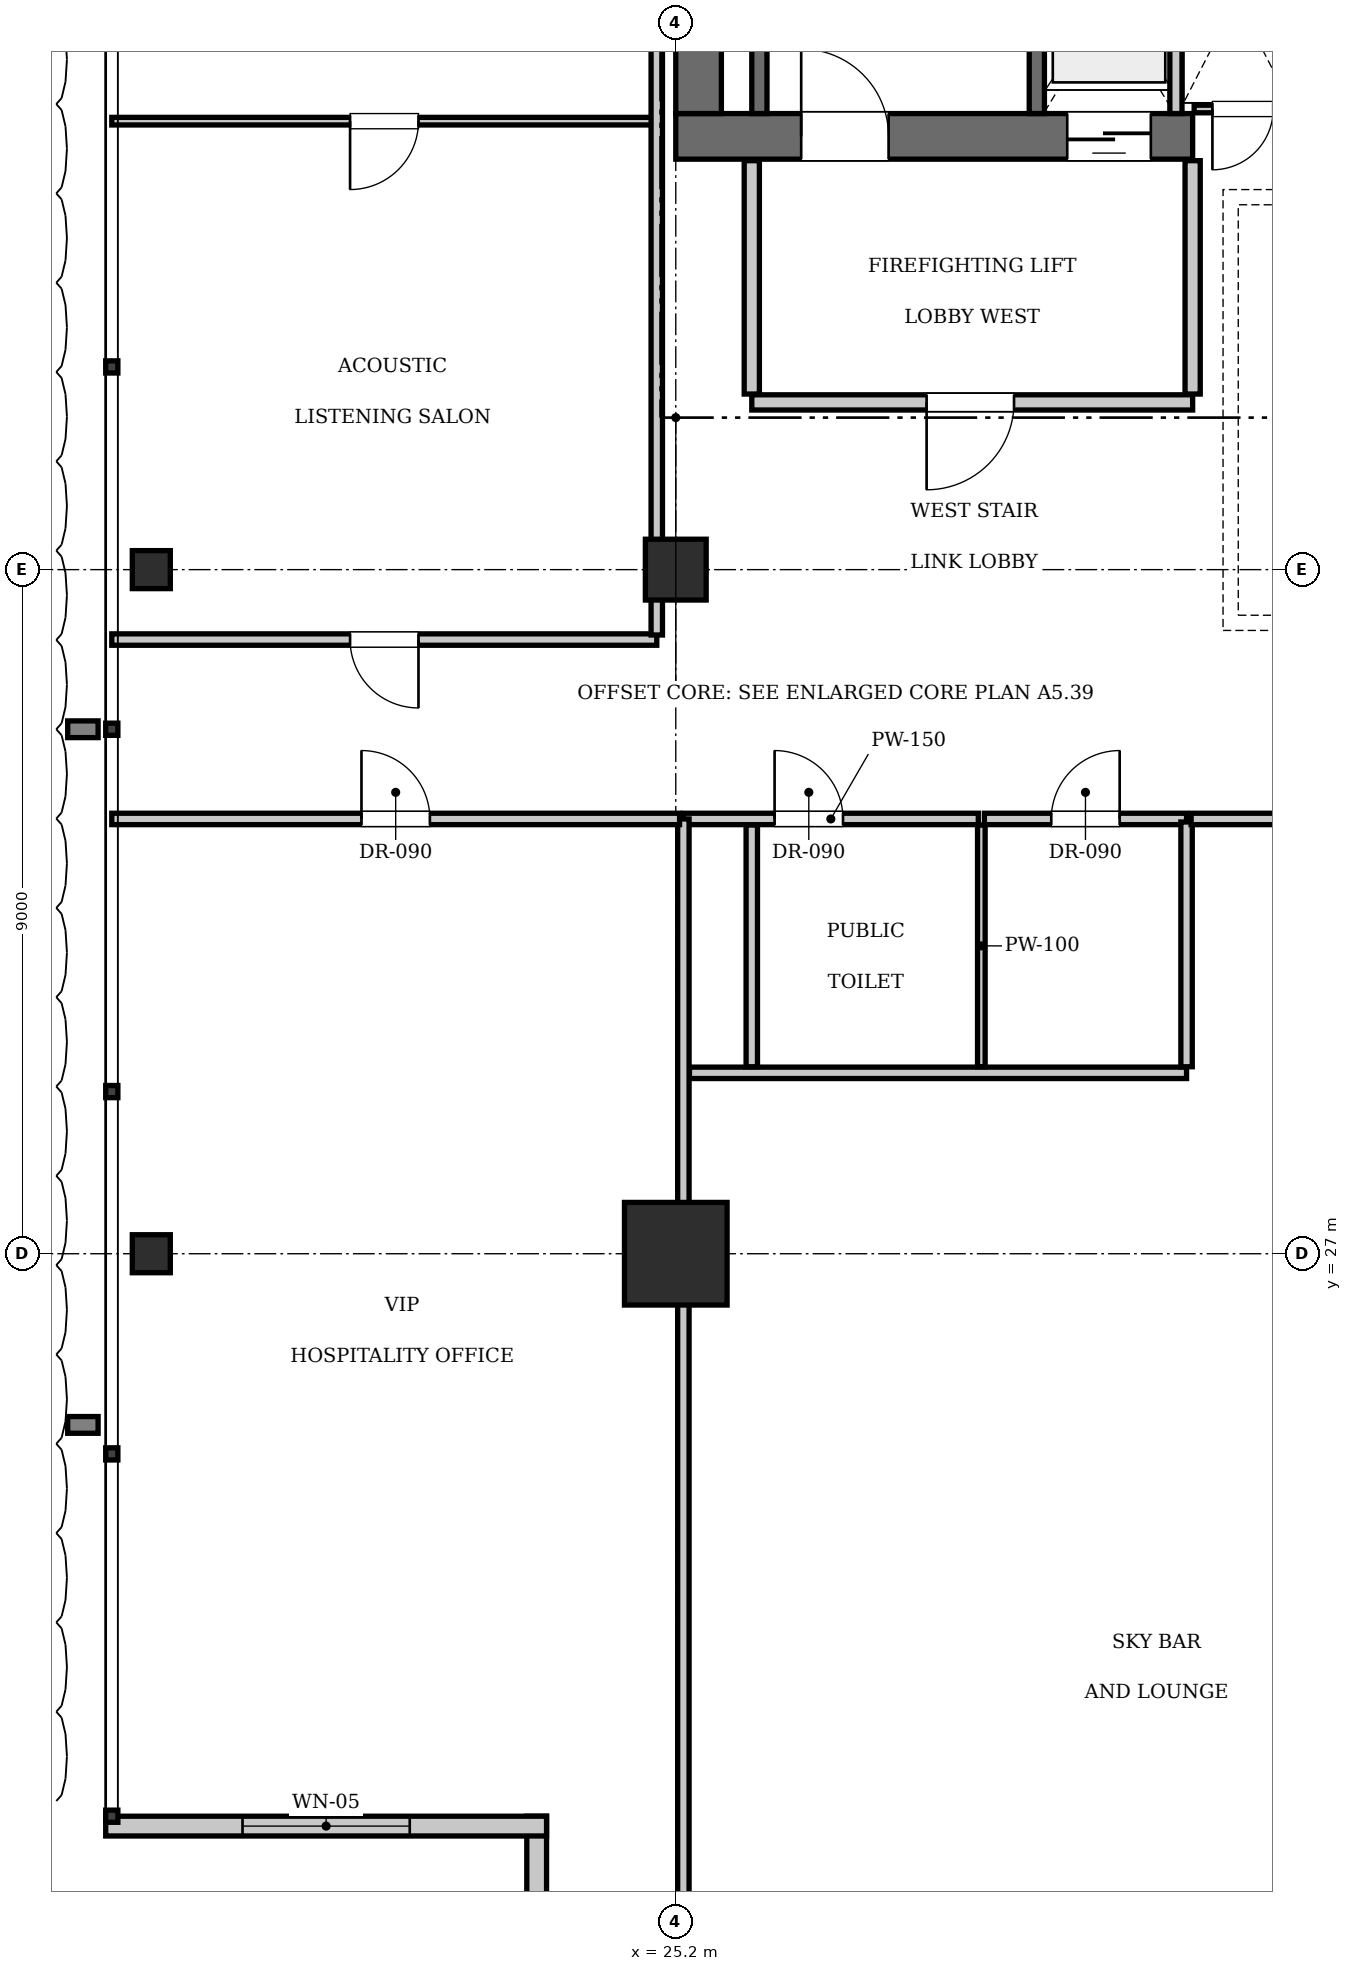
"""IFC4 building model, lengths in metres.
Left out: names, types, materials, properties, quantities, classifications, styles, units other than length and angle.
Written with IfcOpenShell. Run it as: python <this file> out.ifc"""

import sys

from ifc_helpers import new_model, si_unit, direction, frame, frame_2d, origin, origin_2d, place, context, subcontext, project, spatial, rectangle, i_section, extrude, element, fill, save


model = new_model("IFC4")
c1 = context("Model", 3, precision=1e-05, world=origin(), true_north=direction((0.0, 1.0)))
c2 = subcontext(c1, "Body", "Model", "MODEL_VIEW")
j1 = project(units=[si_unit("LENGTHUNIT", "METRE"), si_unit("PLANEANGLEUNIT", "RADIAN")], contexts=[c1])
p1 = place(None, origin())
s1 = spatial("IfcSite", under=j1, at=p1, CompositionType="ELEMENT")
p2 = place(p1, origin())
s2 = spatial("IfcBuilding", under=s1, at=p2, CompositionType="ELEMENT")
p3 = place(p2, frame((0.0, 0.0, 349.65)))
s3 = spatial("IfcBuildingStorey", under=s2, at=p3, CompositionType="ELEMENT", Elevation=349.65)
p4 = place(p3, frame((25.2, 27.0, 0.0), z_axis=(0.0, 0.0, 1.0), x_axis=(1.0, 0.0, 0.0)))
e1 = element("IfcColumn", 1, at=p4, inside=s3, PredefinedType="COLUMN", context=c2, shape_type="SweptSolid", body=[
    extrude(rectangle(XDim=1.35, YDim=1.35, at=origin_2d()), origin(), (0.0, 0.0, 1.0), 4.55),
])
p5 = place(p3, frame((25.2, 41.7, 0.0), z_axis=(0.0, 0.0, 1.0), x_axis=(1.0, 0.0, 0.0)))
e2 = element("IfcWall", 2, at=p5, inside=s3, PredefinedType="SHEAR", context=c2, shape_type="SweptSolid", body=[
    extrude(rectangle(XDim=6.8, YDim=0.6, at=frame_2d((3.4, 0.0))), origin(), (0.0, 0.0, 1.0), 4.55),
])
p6 = place(p5, frame((1.65, 0.0, 0.0)))
e3 = element("IfcOpeningElement", 3, at=p6, cuts=e2, PredefinedType="OPENING", context=c2, shape_type="SweptSolid", body=[
    extrude(rectangle(XDim=1.15, YDim=2.15, at=frame_2d((0.575, 1.075))), frame((0.0, 0.31, 0.0), z_axis=(0.0, -1.0, 0.0), x_axis=(1.0, 0.0, 0.0)), (0.0, 0.0, 1.0), 0.62),
])
p7 = place(p5, frame((5.15, 0.0, 0.0)))
e4 = element("IfcOpeningElement", 4, at=p7, cuts=e2, PredefinedType="OPENING", context=c2, shape_type="SweptSolid", body=[
    extrude(rectangle(XDim=1.1, YDim=2.2, at=frame_2d((0.55, 1.1))), frame((0.0, 0.31, 0.0), z_axis=(0.0, -1.0, 0.0), x_axis=(1.0, 0.0, 0.0)), (0.0, 0.0, 1.0), 0.62),
])
p8 = place(p3, frame((25.5, 42.0, 0.0), z_axis=(0.0, 0.0, 1.0), x_axis=(0.0, 1.0, 0.0)))
e5 = element("IfcWall", 5, at=p8, inside=s3, PredefinedType="SHEAR", context=c2, shape_type="SweptSolid", body=[
    extrude(rectangle(XDim=2.325, YDim=0.6, at=frame_2d((1.163, 0.0))), origin(), (0.0, 0.0, 1.0), 4.55),
])
p9 = place(p3, frame((25.2, 36.0, 0.0), z_axis=(0.0, 0.0, 1.0), x_axis=(1.0, 0.0, 0.0)))
e6 = element("IfcColumn", 6, at=p9, inside=s3, PredefinedType="COLUMN", context=c2, shape_type="SweptSolid", body=[
    extrude(rectangle(XDim=0.8, YDim=0.8, at=origin_2d()), origin(), (0.0, 0.0, 1.0), 4.55),
])
for number, where, z_axis, x_axis in (
    (7, (18.3, 27.0, 0.0), (0.0, 0.0, 1.0), (1.0, 0.0, 0.0)),
    (8, (18.3, 36.0, 0.0), (0.0, 0.0, 1.0), (1.0, 0.0, 0.0)),
):
    element("IfcColumn", number, at=place(p3, frame(where, z_axis=z_axis, x_axis=x_axis)), inside=s3, PredefinedType="COLUMN", context=c2, shape_type="SweptSolid", body=[
        extrude(i_section(OverallWidth=0.5, OverallDepth=0.5, WebThickness=0.022, FlangeThickness=0.032, at=origin_2d()), origin(), (0.0, 0.0, 1.0), 4.55),
    ])
p10 = place(p3, frame((29.95, 42.0, 0.0), z_axis=(0.0, 0.0, 1.0), x_axis=(0.0, 1.0, 0.0)))
e9 = element("IfcWall", 9, at=p10, inside=s3, PredefinedType="SOLIDWALL", context=c2, shape_type="SweptSolid", body=[
    extrude(rectangle(XDim=9.15, YDim=0.2, at=frame_2d((4.575, 0.0))), origin(), (0.0, 0.0, 1.0), 4.29),
])
p11 = place(p3, frame((26.3, 42.0, 0.0), z_axis=(0.0, 0.0, 1.0), x_axis=(0.0, 1.0, 0.0)))
e10 = element("IfcWall", 10, at=p11, inside=s3, PredefinedType="SOLIDWALL", context=c2, shape_type="SweptSolid", body=[
    extrude(rectangle(XDim=9.12, YDim=0.2, at=frame_2d((4.56, 0.0))), origin(), (0.0, 0.0, 1.0), 4.29),
])
p12 = place(p3, frame((31.78, 42.0, 0.0), z_axis=(0.0, 0.0, 1.0), x_axis=(0.0, 1.0, 0.0)))
e11 = element("IfcWall", 11, at=p12, inside=s3, PredefinedType="SOLIDWALL", context=c2, shape_type="SweptSolid", body=[
    extrude(rectangle(XDim=2.74, YDim=0.16, at=frame_2d((1.37, 0.0))), origin(), (0.0, 0.0, 1.0), 4.29),
])
p13 = place(p3, frame((23.37, 13.8, 0.0), z_axis=(0.0, 0.0, 1.0), x_axis=(0.0, 1.0, 0.0)))
e12 = element("IfcWall", 12, at=p13, inside=s3, PredefinedType="SOLIDWALL", context=c2, shape_type="SweptSolid", body=[
    extrude(rectangle(XDim=5.8, YDim=0.26, at=frame_2d((2.9, 0.0))), origin(), (0.0, 0.0, 1.0), 4.29),
])
p14 = place(p3, frame((23.5, 19.47, 0.0), z_axis=(0.0, 0.0, 1.0), x_axis=(-1.0, 0.0, 0.0)))
e13 = element("IfcWall", 13, at=p14, inside=s3, PredefinedType="SOLIDWALL", context=c2, shape_type="SweptSolid", body=[
    extrude(rectangle(XDim=5.8, YDim=0.26, at=frame_2d((2.9, 0.0))), origin(), (0.0, 0.0, 1.0), 4.29),
])
p15 = place(p14, frame((1.8, 0.0, 0.9)))
e14 = element("IfcOpeningElement", 14, at=p15, cuts=e13, PredefinedType="OPENING", context=c2, shape_type="SweptSolid", body=[
    extrude(rectangle(XDim=2.2, YDim=2.8, at=frame_2d((1.1, 1.4))), frame((0.0, 0.14, 0.0), z_axis=(0.0, -1.0, 0.0), x_axis=(1.0, 0.0, 0.0)), (0.0, 0.0, 1.0), 0.28),
])
p16 = place(p3, frame((26.2, 38.2, 0.0), z_axis=(0.0, 0.0, 1.0), x_axis=(1.0, 0.0, 0.0)))
e15 = element("IfcWall", 15, at=p16, inside=s3, PredefinedType="PARTITIONING", context=c2, shape_type="SweptSolid", body=[
    extrude(rectangle(XDim=5.8, YDim=0.2, at=frame_2d((2.9, 0.0))), origin(), (0.0, 0.0, 1.0), 4.29),
])
p17 = place(p16, frame((2.3, 0.0, 0.0)))
e16 = element("IfcOpeningElement", 16, at=p17, cuts=e15, PredefinedType="OPENING", context=c2, shape_type="SweptSolid", body=[
    extrude(rectangle(XDim=1.15, YDim=2.15, at=frame_2d((0.575, 1.075))), frame((0.0, 0.11, 0.0), z_axis=(0.0, -1.0, 0.0), x_axis=(1.0, 0.0, 0.0)), (0.0, 0.0, 1.0), 0.22),
])
for number, where, z_axis, x_axis in (
    (17, (26.2, 38.31, 0.0), (0.0, 0.0, 1.0), (0.0, 1.0, 0.0)),
    (18, (32.0, 38.31, 0.0), (0.0, 0.0, 1.0), (0.0, 1.0, 0.0)),
):
    element("IfcWall", number, at=place(p3, frame(where, z_axis=z_axis, x_axis=x_axis)), inside=s3, PredefinedType="PARTITIONING", context=c2, shape_type="SweptSolid", body=[
        extrude(rectangle(XDim=3.07, YDim=0.2, at=frame_2d((1.535, 0.0))), origin(), (0.0, 0.0, 1.0), 4.29),
    ])
p18 = place(p3, frame((32.02, 42.06, 0.0), z_axis=(0.0, 0.0, 1.0), x_axis=(1.0, 0.0, 0.0)))
e19 = element("IfcWall", 19, at=p18, inside=s3, PredefinedType="PARTITIONING", context=c2, shape_type="SweptSolid", body=[
    extrude(rectangle(XDim=1.32, YDim=0.1, at=frame_2d((0.66, 0.0))), origin(), (0.0, 0.0, 1.0), 4.29),
])
p19 = place(p18, frame((0.24, 0.0, 0.0)))
e20 = element("IfcOpeningElement", 20, at=p19, cuts=e19, PredefinedType="OPENING", context=c2, shape_type="SweptSolid", body=[
    extrude(rectangle(XDim=0.8, YDim=2.05, at=frame_2d((0.4, 1.025))), frame((0.0, 0.06, 0.0), z_axis=(0.0, -1.0, 0.0), x_axis=(1.0, 0.0, 0.0)), (0.0, 0.0, 1.0), 0.12),
])
p20 = place(p3, frame((25.3, 32.72, 0.0), z_axis=(0.0, 0.0, 1.0), x_axis=(1.0, 0.0, 0.0)))
e21 = element("IfcWall", 21, at=p20, inside=s3, PredefinedType="PARTITIONING", context=c2, shape_type="SweptSolid", body=[
    extrude(rectangle(XDim=3.88, YDim=0.15, at=frame_2d((1.94, 0.0))), origin(), (0.0, 0.0, 1.0), 4.29),
])
p21 = place(p20, frame((1.2, 0.0, 0.0)))
e22 = element("IfcOpeningElement", 22, at=p21, cuts=e21, PredefinedType="OPENING", context=c2, shape_type="SweptSolid", body=[
    extrude(rectangle(XDim=0.9, YDim=2.1, at=frame_2d((0.45, 1.05))), frame((0.0, 0.085, 0.0), z_axis=(0.0, -1.0, 0.0), x_axis=(1.0, 0.0, 0.0)), (0.0, 0.0, 1.0), 0.17),
])
p22 = place(p3, frame((29.26, 32.72, 0.0), z_axis=(0.0, 0.0, 1.0), x_axis=(1.0, 0.0, 0.0)))
e23 = element("IfcWall", 23, at=p22, inside=s3, PredefinedType="PARTITIONING", context=c2, shape_type="SweptSolid", body=[
    extrude(rectangle(XDim=2.66, YDim=0.15, at=frame_2d((1.33, 0.0))), origin(), (0.0, 0.0, 1.0), 4.29),
])
p23 = place(p22, frame((0.88, 0.0, 0.0)))
e24 = element("IfcOpeningElement", 24, at=p23, cuts=e23, PredefinedType="OPENING", context=c2, shape_type="SweptSolid", body=[
    extrude(rectangle(XDim=0.9, YDim=2.1, at=frame_2d((0.45, 1.05))), frame((0.0, 0.085, 0.0), z_axis=(0.0, -1.0, 0.0), x_axis=(1.0, 0.0, 0.0)), (0.0, 0.0, 1.0), 0.17),
])
p24 = place(p3, frame((25.38, 29.38, 0.0), z_axis=(0.0, 0.0, 1.0), x_axis=(1.0, 0.0, 0.0)))
e25 = element("IfcWall", 25, at=p24, inside=s3, PredefinedType="PARTITIONING", context=c2, shape_type="SweptSolid", body=[
    extrude(rectangle(XDim=6.54, YDim=0.15, at=frame_2d((3.27, 0.0))), origin(), (0.0, 0.0, 1.0), 4.29),
])
p25 = place(p3, frame((26.2, 29.46, 0.0), z_axis=(0.0, 0.0, 1.0), x_axis=(0.0, 1.0, 0.0)))
e26 = element("IfcWall", 26, at=p25, inside=s3, PredefinedType="PARTITIONING", context=c2, shape_type="SweptSolid", body=[
    extrude(rectangle(XDim=3.18, YDim=0.15, at=frame_2d((1.59, 0.0))), origin(), (0.0, 0.0, 1.0), 4.29),
])
p26 = place(p3, frame((29.22, 29.46, 0.0), z_axis=(0.0, 0.0, 1.0), x_axis=(0.0, 1.0, 0.0)))
e27 = element("IfcWall", 27, at=p26, inside=s3, PredefinedType="PARTITIONING", context=c2, shape_type="SweptSolid", body=[
    extrude(rectangle(XDim=3.18, YDim=0.1, at=frame_2d((1.59, 0.0))), origin(), (0.0, 0.0, 1.0), 4.29),
])
p27 = place(p3, frame((31.92, 29.46, 0.0), z_axis=(0.0, 0.0, 1.0), x_axis=(0.0, 1.0, 0.0)))
e28 = element("IfcWall", 28, at=p27, inside=s3, PredefinedType="PARTITIONING", context=c2, shape_type="SweptSolid", body=[
    extrude(rectangle(XDim=3.22, YDim=0.15, at=frame_2d((1.61, 0.0))), origin(), (0.0, 0.0, 1.0), 4.29),
])
p28 = place(p3, frame((25.3, 13.88, 0.0), z_axis=(0.0, 0.0, 1.0), x_axis=(0.0, 1.0, 0.0)))
e29 = element("IfcWall", 29, at=p28, inside=s3, PredefinedType="PARTITIONING", context=c2, shape_type="SweptSolid", body=[
    extrude(rectangle(XDim=18.84, YDim=0.15, at=frame_2d((9.42, 0.0))), origin(), (0.0, 0.0, 1.0), 3.821),
])
p29 = place(p3, frame((17.78, 32.72, 0.0), z_axis=(0.0, 0.0, 1.0), x_axis=(1.0, 0.0, 0.0)))
e30 = element("IfcWall", 30, at=p29, inside=s3, PredefinedType="PARTITIONING", context=c2, shape_type="SweptSolid", body=[
    extrude(rectangle(XDim=7.47, YDim=0.15, at=frame_2d((3.735, 0.0))), origin(), (0.0, 0.0, 1.0), 4.29),
])
p30 = place(p29, frame((3.285, 0.0, 0.0)))
e31 = element("IfcOpeningElement", 31, at=p30, cuts=e30, PredefinedType="OPENING", context=c2, shape_type="SweptSolid", body=[
    extrude(rectangle(XDim=0.9, YDim=2.1, at=frame_2d((0.45, 1.05))), frame((0.0, 0.085, 0.0), z_axis=(0.0, -1.0, 0.0), x_axis=(1.0, 0.0, 0.0)), (0.0, 0.0, 1.0), 0.17),
])
p31 = place(p3, frame((31.98, 32.72, 0.0), z_axis=(0.0, 0.0, 1.0), x_axis=(1.0, 0.0, 0.0)))
e32 = element("IfcWall", 32, at=p31, inside=s3, PredefinedType="PARTITIONING", context=c2, shape_type="SweptSolid", body=[
    extrude(rectangle(XDim=5.74, YDim=0.15, at=frame_2d((2.87, 0.0))), origin(), (0.0, 0.0, 1.0), 4.29),
])
p32 = place(p31, frame((2.07, 0.0, 0.0)))
e33 = element("IfcOpeningElement", 33, at=p32, cuts=e32, PredefinedType="OPENING", context=c2, shape_type="SweptSolid", body=[
    extrude(rectangle(XDim=1.6, YDim=2.3, at=frame_2d((0.8, 1.15))), frame((0.0, 0.085, 0.0), z_axis=(0.0, -1.0, 0.0), x_axis=(1.0, 0.0, 0.0)), (0.0, 0.0, 1.0), 0.17),
])
p33 = place(p3, frame((17.78, 35.08, 0.0), z_axis=(0.0, 0.0, 1.0), x_axis=(1.0, 0.0, 0.0)))
e34 = element("IfcWall", 34, at=p33, inside=s3, PredefinedType="PARTITIONING", context=c2, shape_type="SweptSolid", body=[
    extrude(rectangle(XDim=7.17, YDim=0.15, at=frame_2d((3.585, 0.0))), origin(), (0.0, 0.0, 1.0), 4.29),
])
p34 = place(p33, frame((3.135, 0.0, 0.0)))
e35 = element("IfcOpeningElement", 35, at=p34, cuts=e34, PredefinedType="OPENING", context=c2, shape_type="SweptSolid", body=[
    extrude(rectangle(XDim=0.9, YDim=2.1, at=frame_2d((0.45, 1.05))), frame((0.0, 0.085, 0.0), z_axis=(0.0, -1.0, 0.0), x_axis=(1.0, 0.0, 0.0)), (0.0, 0.0, 1.0), 0.17),
])
p35 = place(p3, frame((17.78, 41.9, 0.0), z_axis=(0.0, 0.0, 1.0), x_axis=(1.0, 0.0, 0.0)))
e36 = element("IfcWall", 36, at=p35, inside=s3, PredefinedType="PARTITIONING", context=c2, shape_type="SweptSolid", body=[
    extrude(rectangle(XDim=7.17, YDim=0.1, at=frame_2d((3.585, 0.0))), origin(), (0.0, 0.0, 1.0), 4.29),
])
p36 = place(p35, frame((3.135, 0.0, 0.0)))
e37 = element("IfcOpeningElement", 37, at=p36, cuts=e36, PredefinedType="OPENING", context=c2, shape_type="SweptSolid", body=[
    extrude(rectangle(XDim=0.9, YDim=2.1, at=frame_2d((0.45, 1.05))), frame((0.0, 0.06, 0.0), z_axis=(0.0, -1.0, 0.0), x_axis=(1.0, 0.0, 0.0)), (0.0, 0.0, 1.0), 0.12),
])
p37 = place(p3, frame((24.95, 35.14, 0.0), z_axis=(0.0, 0.0, 1.0), x_axis=(0.0, 1.0, 0.0)))
e38 = element("IfcWall", 38, at=p37, inside=s3, PredefinedType="PARTITIONING", context=c2, shape_type="SweptSolid", body=[
    extrude(rectangle(XDim=18.78, YDim=0.15, at=frame_2d((9.39, 0.0))), origin(), (0.0, 0.0, 1.0), 4.29),
])
p38 = place(p6, origin())
e39 = element("IfcDoor", 39, at=p38, inside=s3, OperationType="SINGLE_SWING_LEFT", PredefinedType="DOOR", context=c2, shape_type="SweptSolid", body=[
    extrude(rectangle(XDim=1.15, YDim=2.15, at=frame_2d((0.575, 1.075))), frame((0.0, 0.025, 0.0), z_axis=(0.0, -1.0, 0.0), x_axis=(1.0, 0.0, 0.0)), (0.0, 0.0, 1.0), 0.05),
])
fill(e3, e39)
p39 = place(p7, frame((1.1, 0.0, 0.0), z_axis=(0.0, 0.0, 1.0), x_axis=(-1.0, 0.0, 0.0)))
e40 = element("IfcDoor", 40, at=p39, inside=s3, OperationType="SLIDING_TO_LEFT", PredefinedType="DOOR", context=c2, shape_type="SweptSolid", body=[
    extrude(rectangle(XDim=1.1, YDim=2.2, at=frame_2d((0.55, 1.1))), frame((0.0, 0.025, 0.0), z_axis=(0.0, -1.0, 0.0), x_axis=(1.0, 0.0, 0.0)), (0.0, 0.0, 1.0), 0.05),
])
fill(e4, e40)
p40 = place(p15, origin())
e41 = element("IfcWindow", 41, at=p40, inside=s3, PartitioningType="SINGLE_PANEL", PredefinedType="WINDOW", context=c2, shape_type="SweptSolid", body=[
    extrude(rectangle(XDim=2.2, YDim=2.8, at=frame_2d((1.1, 1.4))), frame((0.0, 0.03, 0.0), z_axis=(0.0, -1.0, 0.0), x_axis=(1.0, 0.0, 0.0)), (0.0, 0.0, 1.0), 0.06),
])
fill(e14, e41)
p41 = place(p17, frame((1.15, 0.0, 0.0), z_axis=(0.0, 0.0, 1.0), x_axis=(-1.0, 0.0, 0.0)))
e42 = element("IfcDoor", 42, at=p41, inside=s3, OperationType="SINGLE_SWING_RIGHT", PredefinedType="DOOR", context=c2, shape_type="SweptSolid", body=[
    extrude(rectangle(XDim=1.15, YDim=2.15, at=frame_2d((0.575, 1.075))), frame((0.0, 0.025, 0.0), z_axis=(0.0, -1.0, 0.0), x_axis=(1.0, 0.0, 0.0)), (0.0, 0.0, 1.0), 0.05),
])
fill(e16, e42)
p42 = place(p19, frame((0.8, 0.0, 0.0), z_axis=(0.0, 0.0, 1.0), x_axis=(-1.0, 0.0, 0.0)))
e43 = element("IfcDoor", 43, at=p42, inside=s3, OperationType="SINGLE_SWING_RIGHT", PredefinedType="DOOR", context=c2, shape_type="SweptSolid", body=[
    extrude(rectangle(XDim=0.8, YDim=2.05, at=frame_2d((0.4, 1.025))), frame((0.0, 0.025, 0.0), z_axis=(0.0, -1.0, 0.0), x_axis=(1.0, 0.0, 0.0)), (0.0, 0.0, 1.0), 0.05),
])
fill(e20, e43)
p43 = place(p21, origin())
e44 = element("IfcDoor", 44, at=p43, inside=s3, OperationType="SINGLE_SWING_LEFT", PredefinedType="DOOR", context=c2, shape_type="SweptSolid", body=[
    extrude(rectangle(XDim=0.9, YDim=2.1, at=frame_2d((0.45, 1.05))), frame((0.0, 0.025, 0.0), z_axis=(0.0, -1.0, 0.0), x_axis=(1.0, 0.0, 0.0)), (0.0, 0.0, 1.0), 0.05),
])
fill(e22, e44)
p44 = place(p23, origin())
e45 = element("IfcDoor", 45, at=p44, inside=s3, OperationType="SINGLE_SWING_RIGHT", PredefinedType="DOOR", context=c2, shape_type="SweptSolid", body=[
    extrude(rectangle(XDim=0.9, YDim=2.1, at=frame_2d((0.45, 1.05))), frame((0.0, 0.025, 0.0), z_axis=(0.0, -1.0, 0.0), x_axis=(1.0, 0.0, 0.0)), (0.0, 0.0, 1.0), 0.05),
])
fill(e24, e45)
p45 = place(p30, origin())
e46 = element("IfcDoor", 46, at=p45, inside=s3, OperationType="SINGLE_SWING_LEFT", PredefinedType="DOOR", context=c2, shape_type="SweptSolid", body=[
    extrude(rectangle(XDim=0.9, YDim=2.1, at=frame_2d((0.45, 1.05))), frame((0.0, 0.025, 0.0), z_axis=(0.0, -1.0, 0.0), x_axis=(1.0, 0.0, 0.0)), (0.0, 0.0, 1.0), 0.05),
])
fill(e31, e46)
p46 = place(p34, frame((0.9, 0.0, 0.0), z_axis=(0.0, 0.0, 1.0), x_axis=(-1.0, 0.0, 0.0)))
e47 = element("IfcDoor", 47, at=p46, inside=s3, OperationType="SINGLE_SWING_LEFT", PredefinedType="DOOR", context=c2, shape_type="SweptSolid", body=[
    extrude(rectangle(XDim=0.9, YDim=2.1, at=frame_2d((0.45, 1.05))), frame((0.0, 0.025, 0.0), z_axis=(0.0, -1.0, 0.0), x_axis=(1.0, 0.0, 0.0)), (0.0, 0.0, 1.0), 0.05),
])
fill(e35, e47)
p47 = place(p36, frame((0.9, 0.0, 0.0), z_axis=(0.0, 0.0, 1.0), x_axis=(-1.0, 0.0, 0.0)))
e48 = element("IfcDoor", 48, at=p47, inside=s3, OperationType="SINGLE_SWING_RIGHT", PredefinedType="DOOR", context=c2, shape_type="SweptSolid", body=[
    extrude(rectangle(XDim=0.9, YDim=2.1, at=frame_2d((0.45, 1.05))), frame((0.0, 0.025, 0.0), z_axis=(0.0, -1.0, 0.0), x_axis=(1.0, 0.0, 0.0)), (0.0, 0.0, 1.0), 0.05),
])
fill(e37, e48)
save(model, sys.argv[1])
